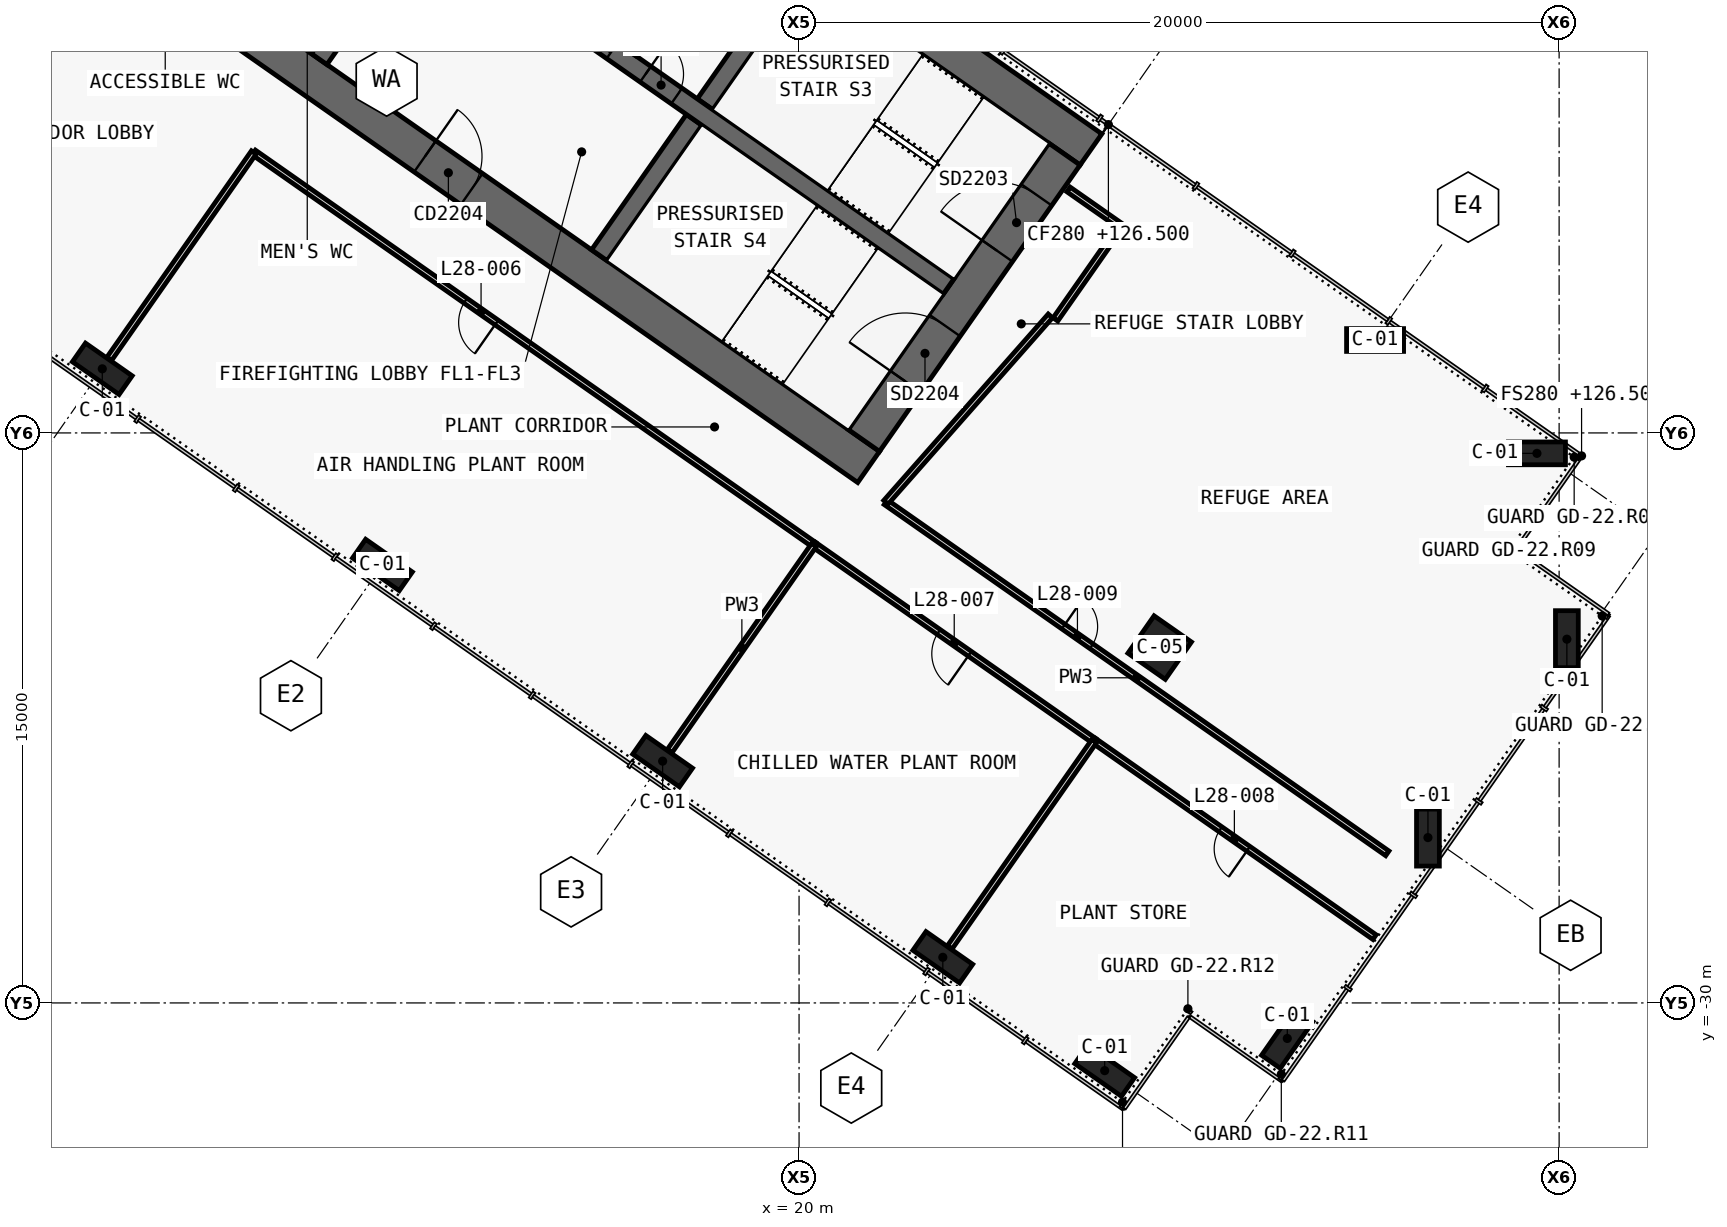
"""IFC4 building model, lengths in metres.
Left out: names, types, materials, properties, quantities, classifications, styles, units other than length and angle.
Written with IfcOpenShell. Run it as: python <this file> out.ifc"""

import sys

from ifc_helpers import new_model, si_unit, direction, frame, frame_2d, origin, origin_2d, place, context, subcontext, project, spatial, polyline, rectangle, outline, extrude, clip, halfspace, element, fill, save


model = new_model("IFC4")
c1 = context("Model", 3, precision=1e-05, world=origin(), true_north=direction((0.0, 1.0)))
c2 = subcontext(c1, "Body", "Model", "MODEL_VIEW")
j1 = project(units=[si_unit("LENGTHUNIT", "METRE"), si_unit("PLANEANGLEUNIT", "RADIAN")], contexts=[c1])
p1 = place(None, origin())
s1 = spatial("IfcSite", under=j1, at=p1, CompositionType="ELEMENT")
p2 = place(p1, origin())
s2 = spatial("IfcBuilding", under=s1, at=p2, CompositionType="ELEMENT")
p3 = place(p2, frame((0.0, 0.0, 126.5)))
s3 = spatial("IfcBuildingStorey", under=s2, at=p3, CompositionType="ELEMENT", Elevation=126.5)
p4 = place(p3, frame((-0.037, 11.867, 0.0), z_axis=(0.0, 0.0, 1.0), x_axis=(0.819155306259, -0.573571777746, 0.0)))
e1 = element("IfcWall", 1, at=p4, inside=s3, PredefinedType="SHEAR", context=c2, shape_type="SweptSolid", body=[
    extrude(outline(polyline([(33.837, 0.5), (0.0, 0.5), (0.7, -0.5), (33.837, -0.5), (33.837, 0.5)])), origin(), (0.0, 0.0, 1.0), 5.5),
])
p5 = place(p3, frame((-0.037, -0.585, 0.0), z_axis=(0.0, 0.0, 1.0), x_axis=(0.819157152511, -0.573569140985, 0.0)))
e2 = element("IfcWall", 2, at=p5, inside=s3, PredefinedType="SHEAR", context=c2, shape_type="SweptSolid", body=[
    extrude(outline(polyline([(26.695, 0.5), (0.0, 0.5), (0.7, -0.5), (26.695, -0.5), (26.695, 0.5)])), origin(), (0.0, 0.0, 1.0), 5.5),
])
p6 = place(p5, frame((1.045, 0.0, 0.0)))
e3 = element("IfcOpeningElement", 3, at=p6, cuts=e2, PredefinedType="OPENING", context=c2, shape_type="SweptSolid", body=[
    extrude(rectangle(XDim=1.5, YDim=2.1, at=frame_2d((0.75, 1.05))), frame((0.0, 0.51, 0.0), z_axis=(0.0, -1.0, 0.0), x_axis=(1.0, 0.0, 0.0)), (0.0, 0.0, 1.0), 1.02),
])
p7 = place(p5, frame((12.445, 0.0, 0.0)))
e4 = element("IfcOpeningElement", 4, at=p7, cuts=e2, PredefinedType="OPENING", context=c2, shape_type="SweptSolid", body=[
    extrude(rectangle(XDim=1.5, YDim=2.1, at=frame_2d((0.75, 1.05))), frame((0.0, 0.51, 0.0), z_axis=(0.0, -1.0, 0.0), x_axis=(1.0, 0.0, 0.0)), (0.0, 0.0, 1.0), 1.02),
])
p8 = place(p3, frame((21.708, -15.2, 0.0), z_axis=(0.0, 0.0, 1.0), x_axis=(0.573576324356, 0.819152122709, 0.0)))
e5 = element("IfcWall", 5, at=p8, inside=s3, PredefinedType="SHEAR", context=c2, shape_type="SweptSolid", body=[
    extrude(outline(polyline([(9.2, 0.5), (0.0, 0.5), (0.0, -0.5), (9.2, -0.5), (9.2, 0.5)])), origin(), (0.0, 0.0, 1.0), 5.5),
])
p9 = place(p8, frame((6.1, 0.0, 0.0)))
e6 = element("IfcOpeningElement", 6, at=p9, cuts=e5, PredefinedType="OPENING", context=c2, shape_type="SweptSolid", body=[
    extrude(rectangle(XDim=1.8, YDim=2.1, at=frame_2d((0.9, 1.05))), frame((0.0, 0.51, 0.0), z_axis=(0.0, -1.0, 0.0), x_axis=(1.0, 0.0, 0.0)), (0.0, 0.0, 1.0), 1.02),
])
p10 = place(p8, frame((1.9, 0.0, 0.0)))
e7 = element("IfcOpeningElement", 7, at=p10, cuts=e5, PredefinedType="OPENING", context=c2, shape_type="SweptSolid", body=[
    extrude(rectangle(XDim=1.8, YDim=2.1, at=frame_2d((0.9, 1.05))), frame((0.0, 0.51, 0.0), z_axis=(0.0, -1.0, 0.0), x_axis=(1.0, 0.0, 0.0)), (0.0, 0.0, 1.0), 1.02),
])
p11 = place(p3, frame((7.372, -5.162, 0.0), z_axis=(0.0, 0.0, 1.0), x_axis=(0.573594173421, 0.819139624372, 0.0)))
e8 = element("IfcWall", 8, at=p11, inside=s3, PredefinedType="SHEAR", context=c2, shape_type="SweptSolid", body=[
    extrude(outline(polyline([(0.0, 0.25), (0.0, -0.25), (4.35, -0.25), (4.35, 0.25), (0.0, 0.25)])), origin(), (0.0, 0.0, 1.0), 5.5),
])
p12 = place(p3, frame((14.745, -10.324, 0.0), z_axis=(0.0, 0.0, 1.0), x_axis=(0.57356780395, 0.819158088694, 0.0)))
e9 = element("IfcWall", 9, at=p12, inside=s3, PredefinedType="SHEAR", context=c2, shape_type="SweptSolid", body=[
    extrude(outline(polyline([(0.0, 0.25), (0.0, -0.25), (4.35, -0.25), (4.35, 0.25), (0.0, 0.25)])), origin(), (0.0, 0.0, 1.0), 5.5),
])
p13 = place(p3, frame((17.527, -6.352, 0.0), z_axis=(0.0, 0.0, 1.0), x_axis=(0.573530143085, 0.819184457233, 0.0)))
e10 = element("IfcWall", 10, at=p13, inside=s3, PredefinedType="SHEAR", context=c2, shape_type="SweptSolid", body=[
    extrude(outline(polyline([(4.35, -0.25), (4.35, 0.25), (0.0, 0.25), (0.0, -0.25), (4.35, -0.25)])), origin(), (0.0, 0.0, 1.0), 5.5),
])
p14 = place(p3, frame((2.638, 3.768, 0.0), z_axis=(0.0, 0.0, 1.0), x_axis=(0.819148977158, -0.573580816643, 0.0)))
e11 = element("IfcWall", 11, at=p14, inside=s3, PredefinedType="SHEAR", context=c2, shape_type="SweptSolid", body=[
    extrude(outline(polyline([(0.0, 0.25), (0.0, -0.25), (26.0, -0.25), (26.0, 0.25), (0.0, 0.25)])), origin(), (0.0, 0.0, 1.0), 5.5),
])
p15 = place(p14, frame((9.637, 0.0, 0.0)))
e12 = element("IfcOpeningElement", 12, at=p15, cuts=e11, PredefinedType="OPENING", context=c2, shape_type="SweptSolid", body=[
    extrude(rectangle(XDim=1.2, YDim=2.1, at=frame_2d((0.6, 1.05))), frame((0.0, 0.26, 0.0), z_axis=(0.0, -1.0, 0.0), x_axis=(1.0, 0.0, 0.0)), (0.0, 0.0, 1.0), 0.52),
])
p16 = place(p14, frame((11.812, 0.0, 0.0)))
e13 = element("IfcOpeningElement", 13, at=p16, cuts=e11, PredefinedType="OPENING", context=c2, shape_type="SweptSolid", body=[
    extrude(rectangle(XDim=1.2, YDim=2.1, at=frame_2d((0.6, 1.05))), frame((0.0, 0.26, 0.0), z_axis=(0.0, -1.0, 0.0), x_axis=(1.0, 0.0, 0.0)), (0.0, 0.0, 1.0), 0.52),
])
p17 = place(p14, frame((13.988, 0.0, 0.0)))
e14 = element("IfcOpeningElement", 14, at=p17, cuts=e11, PredefinedType="OPENING", context=c2, shape_type="SweptSolid", body=[
    extrude(rectangle(XDim=1.2, YDim=2.1, at=frame_2d((0.6, 1.05))), frame((0.0, 0.26, 0.0), z_axis=(0.0, -1.0, 0.0), x_axis=(1.0, 0.0, 0.0)), (0.0, 0.0, 1.0), 0.52),
])
p18 = place(p14, frame((16.262, 0.0, 0.0)))
e15 = element("IfcOpeningElement", 15, at=p18, cuts=e11, PredefinedType="OPENING", context=c2, shape_type="SweptSolid", body=[
    extrude(rectangle(XDim=1.0, YDim=2.1, at=frame_2d((0.5, 1.05))), frame((0.0, 0.26, 0.0), z_axis=(0.0, -1.0, 0.0), x_axis=(1.0, 0.0, 0.0)), (0.0, 0.0, 1.0), 0.52),
])
for number, where, z_axis, x_axis in (
    (16, (1.665, -13.313, 0.0), (0.0, 0.0, 1.0), (0.819, -0.574, 0.0)),
    (17, (9.038, -18.475, 0.0), (0.0, 0.0, 1.0), (0.819, -0.574, 0.0)),
    (18, (16.41, -23.637, 0.0), (0.0, 0.0, 1.0), (0.819, -0.574, 0.0)),
    (19, (23.782, -28.799, 0.0), (0.0, 0.0, 1.0), (0.819, -0.574, 0.0)),
    (20, (28.042, -31.782, 0.0), (0.0, 0.0, 1.0), (0.819, -0.574, 0.0)),
):
    element("IfcColumn", number, at=place(p3, frame(where, z_axis=z_axis, x_axis=x_axis)), inside=s3, PredefinedType="COLUMN", context=c2, shape_type="SweptSolid", body=[
        extrude(rectangle(XDim=1.5, YDim=0.6, at=origin_2d()), origin(), (0.0, 0.0, 1.0), 5.5),
    ])
p19 = place(p3, frame((35.197, -12.498, 0.0), z_axis=(-0.260185843605, -0.371634610267, 0.891173969121), x_axis=(0.819188821475, -0.573523909503, 0.0)))
e21 = element("IfcColumn", 21, at=p19, inside=s3, PredefinedType="COLUMN", context=c2, shape_type="Clipping", body=[
    clip(clip(extrude(rectangle(XDim=1.5, YDim=0.6, at=origin_2d()), origin(), (0.0, 0.0, 1.0), 6.172), halfspace(frame((0.0, 0.0, 0.153), z_axis=(0.0, 0.0, 1.0), x_axis=(1.0, 0.0, 0.0)), True)), halfspace(frame((0.0, 0.0, 6.019), z_axis=(0.0, 0.0, 1.0), x_axis=(1.0, 0.0, 0.0)), False)),
])
p20 = place(p3, frame((39.456, -15.481, 0.0), z_axis=(-0.260224642099, -0.37163058595, 0.891164318872), x_axis=(0.819145722339, -0.573585464926, 0.0)))
e22 = element("IfcColumn", 22, at=p20, inside=s3, PredefinedType="COLUMN", context=c2, shape_type="Clipping", body=[
    clip(clip(extrude(rectangle(XDim=1.5, YDim=0.6, at=origin_2d()), origin(), (0.0, 0.0, 1.0), 6.172), halfspace(frame((0.0, 0.0, 0.153), z_axis=(0.0, 0.0, 1.0), x_axis=(1.0, 0.0, 0.0)), True)), halfspace(frame((0.0, 0.0, 6.019), z_axis=(0.0, 0.0, 1.0), x_axis=(1.0, 0.0, 0.0)), False)),
])
p21 = place(p3, frame((32.847, -30.935, 0.0), z_axis=(0.0, 0.0, 1.0), x_axis=(0.573576436351, 0.819152044289, 0.0)))
e23 = element("IfcColumn", 23, at=p21, inside=s3, PredefinedType="COLUMN", context=c2, shape_type="SweptSolid", body=[
    extrude(rectangle(XDim=1.5, YDim=0.6, at=origin_2d()), origin(), (0.0, 0.0, 1.0), 5.5),
])
p22 = place(p3, frame((36.575, -25.61, 0.0), z_axis=(-0.141498421705, -0.202101070375, 0.969088929876), x_axis=(0.555808958936, 0.793857515663, 0.246711665698)))
e24 = element("IfcColumn", 24, at=p22, inside=s3, PredefinedType="COLUMN", context=c2, shape_type="Clipping", body=[
    clip(clip(extrude(rectangle(XDim=1.5, YDim=0.6, at=origin_2d()), origin(), (0.0, 0.0, 1.0), 5.675), halfspace(frame((0.0, 0.0, 0.191), z_axis=(0.0, 0.0, 1.0), x_axis=(1.0, 0.0, 0.0)), True)), halfspace(frame((0.0, 0.0, 5.484), z_axis=(0.0, 0.0, 1.0), x_axis=(1.0, 0.0, 0.0)), False)),
])
p23 = place(p3, frame((40.303, -20.286, 0.0), z_axis=(-0.260254273865, -0.37166928651, 0.891139525776), x_axis=(0.511148016967, 0.729970793355, 0.453729374848)))
e25 = element("IfcColumn", 25, at=p23, inside=s3, PredefinedType="COLUMN", context=c2, shape_type="Clipping", body=[
    clip(clip(extrude(rectangle(XDim=1.5, YDim=0.6, at=origin_2d()), origin(), (0.0, 0.0, 1.0), 6.172), halfspace(frame((0.0, 0.0, 0.382), z_axis=(0.0, 0.0, 1.0), x_axis=(1.0, 0.0, 0.0)), True)), halfspace(frame((0.0, 0.0, 5.79), z_axis=(0.0, 0.0, 1.0), x_axis=(1.0, 0.0, 0.0)), False)),
])
p24 = place(p3, frame((29.49, -20.649, 0.0), z_axis=(0.0, 0.0, 1.0), x_axis=(0.819152044289, -0.573576436351, 0.0)))
e26 = element("IfcColumn", 26, at=p24, inside=s3, PredefinedType="COLUMN", context=c2, shape_type="SweptSolid", body=[
    extrude(rectangle(XDim=1.2, YDim=1.2, at=origin_2d()), origin(), (0.0, 0.0, 1.0), 5.5),
])
p25 = place(p3, frame((15.622, -5.018, 0.0), z_axis=(0.0, 0.0, 1.0), x_axis=(0.573594173421, 0.819139624372, 0.0)))
e27 = element("IfcWall", 27, at=p25, inside=s3, PredefinedType="SOLIDWALL", context=c2, shape_type="SweptSolid", body=[
    extrude(rectangle(XDim=4.35, YDim=0.2, at=frame_2d((2.175, 0.0))), origin(), (0.0, 0.0, 1.0), 5.5),
])
p26 = place(p3, frame((22.284, -16.824, 0.0), z_axis=(0.0, 0.0, 1.0), x_axis=(0.819150741326, -0.573578297171, 0.0)))
e28 = element("IfcWall", 28, at=p26, inside=s3, PredefinedType="PARTITIONING", context=c2, shape_type="SweptSolid", body=[
    extrude(rectangle(XDim=16.109, YDim=0.15, at=frame_2d((8.054, 0.0))), origin(), (0.0, 0.0, 1.0), 4.6),
])
p27 = place(p26, frame((5.704, 0.0, 0.0)))
e29 = element("IfcOpeningElement", 29, at=p27, cuts=e28, PredefinedType="OPENING", context=c2, shape_type="SweptSolid", body=[
    extrude(rectangle(XDim=0.9, YDim=2.1, at=frame_2d((0.45, 1.05))), frame((0.0, 0.085, 0.0), z_axis=(0.0, -1.0, 0.0), x_axis=(1.0, 0.0, 0.0)), (0.0, 0.0, 1.0), 0.17),
])
p28 = place(p3, frame((20.398, -17.945, 0.0), z_axis=(0.0, 0.0, 1.0), x_axis=(-0.81916437852, 0.57355882084, 0.0)))
e30 = element("IfcWall", 30, at=p28, inside=s3, PredefinedType="PARTITIONING", context=c2, shape_type="SweptSolid", body=[
    extrude(rectangle(XDim=18.002, YDim=0.15, at=frame_2d((9.001, 0.0))), origin(), (0.0, 0.0, 1.0), 4.6),
])
p29 = place(p28, frame((10.201, 0.0, 0.0)))
e31 = element("IfcOpeningElement", 31, at=p29, cuts=e30, PredefinedType="OPENING", context=c2, shape_type="SweptSolid", body=[
    extrude(rectangle(XDim=1.0, YDim=2.1, at=frame_2d((0.5, 1.05))), frame((0.0, 0.085, 0.0), z_axis=(0.0, -1.0, 0.0), x_axis=(1.0, 0.0, 0.0)), (0.0, 0.0, 1.0), 0.17),
])
p30 = place(p3, frame((27.771, -23.107, 0.0), z_axis=(0.0, 0.0, 1.0), x_axis=(-0.819164400877, 0.57355878891, 0.0)))
e32 = element("IfcWall", 32, at=p30, inside=s3, PredefinedType="PARTITIONING", context=c2, shape_type="SweptSolid", body=[
    extrude(rectangle(XDim=9.004, YDim=0.15, at=frame_2d((4.502, 0.0))), origin(), (0.0, 0.0, 1.0), 4.6),
])
p31 = place(p30, frame((4.002, 0.0, 0.0)))
e33 = element("IfcOpeningElement", 33, at=p31, cuts=e32, PredefinedType="OPENING", context=c2, shape_type="SweptSolid", body=[
    extrude(rectangle(XDim=1.0, YDim=2.1, at=frame_2d((0.5, 1.05))), frame((0.0, 0.085, 0.0), z_axis=(0.0, -1.0, 0.0), x_axis=(1.0, 0.0, 0.0)), (0.0, 0.0, 1.0), 0.17),
])
p32 = place(p3, frame((35.142, -28.268, 0.0), z_axis=(0.0, 0.0, 1.0), x_axis=(-0.819165659482, 0.573556991349, 0.0)))
e34 = element("IfcWall", 34, at=p32, inside=s3, PredefinedType="PARTITIONING", context=c2, shape_type="SweptSolid", body=[
    extrude(rectangle(XDim=9.002, YDim=0.15, at=frame_2d((4.501, 0.0))), origin(), (0.0, 0.0, 1.0), 4.5),
])
p33 = place(p32, frame((4.051, 0.0, 0.0)))
e35 = element("IfcOpeningElement", 35, at=p33, cuts=e34, PredefinedType="OPENING", context=c2, shape_type="SweptSolid", body=[
    extrude(rectangle(XDim=0.9, YDim=2.1, at=frame_2d((0.45, 1.05))), frame((0.0, 0.085, 0.0), z_axis=(0.0, -1.0, 0.0), x_axis=(1.0, 0.0, 0.0)), (0.0, 0.0, 1.0), 0.17),
])
p34 = place(p3, frame((22.285, -16.825, 0.0), z_axis=(0.0, 0.0, 1.0), x_axis=(0.661551268245, 0.749899939647, 0.0)))
e36 = element("IfcWall", 36, at=p34, inside=s3, PredefinedType="PARTITIONING", context=c2, shape_type="SweptSolid", body=[
    extrude(rectangle(XDim=6.541, YDim=0.15, at=frame_2d((3.271, 0.0))), origin(), (0.0, 0.0, 1.0), 4.6),
])
p35 = place(p3, frame((26.746, -12.014, 0.0), z_axis=(0.0, 0.0, 1.0), x_axis=(0.573560650686, 0.819163097304, 0.0)))
e37 = element("IfcWall", 37, at=p35, inside=s3, PredefinedType="PARTITIONING", context=c2, shape_type="SweptSolid", body=[
    extrude(rectangle(XDim=3.0, YDim=0.15, at=frame_2d((1.5, 0.0))), origin(), (0.0, 0.0, 1.0), 4.6),
])
p36 = place(p3, frame((28.467, -9.556, 0.0), z_axis=(0.0, 0.0, 1.0), x_axis=(-0.819109000826, 0.573637903879, 0.0)))
e38 = element("IfcWall", 38, at=p36, inside=s3, PredefinedType="PARTITIONING", context=c2, shape_type="SweptSolid", body=[
    extrude(rectangle(XDim=1.68, YDim=0.15, at=frame_2d((0.84, 0.0))), origin(), (0.0, 0.0, 1.0), 5.22),
])
p37 = place(p3, frame((20.396, -17.944, 0.0), z_axis=(0.0, 0.0, 1.0), x_axis=(-0.57359826181, -0.819136761505, 0.0)))
e39 = element("IfcWall", 39, at=p37, inside=s3, PredefinedType="PARTITIONING", context=c2, shape_type="SweptSolid", body=[
    extrude(rectangle(XDim=6.63, YDim=0.15, at=frame_2d((3.315, 0.0))), origin(), (0.0, 0.0, 1.0), 4.6),
])
p38 = place(p3, frame((1.849, -13.051, 0.0), z_axis=(0.0, 0.0, 1.0), x_axis=(0.57357355307, 0.819154063177, 0.0)))
e40 = element("IfcWall", 40, at=p38, inside=s3, PredefinedType="PARTITIONING", context=c2, shape_type="SweptSolid", body=[
    extrude(rectangle(XDim=6.63, YDim=0.15, at=frame_2d((3.315, 0.0))), origin(), (0.0, 0.0, 1.0), 4.6),
])
p39 = place(p3, frame((27.769, -23.106, 0.0), z_axis=(0.0, 0.0, 1.0), x_axis=(-0.57359826181, -0.819136761505, 0.0)))
e41 = element("IfcWall", 41, at=p39, inside=s3, PredefinedType="PARTITIONING", context=c2, shape_type="SweptSolid", body=[
    extrude(rectangle(XDim=6.63, YDim=0.15, at=frame_2d((3.315, 0.0))), origin(), (0.0, 0.0, 1.0), 4.6),
])
p40 = place(p18, origin())
e42 = element("IfcDoor", 42, at=p40, inside=s3, OperationType="SINGLE_SWING_RIGHT", PredefinedType="DOOR", context=c2, shape_type="SweptSolid", body=[
    extrude(rectangle(XDim=1.0, YDim=2.1, at=frame_2d((0.5, 1.05))), frame((0.0, 0.025, 0.0), z_axis=(0.0, -1.0, 0.0), x_axis=(1.0, 0.0, 0.0)), (0.0, 0.0, 1.0), 0.05),
])
fill(e15, e42)
p41 = place(p7, origin())
e43 = element("IfcDoor", 43, at=p41, inside=s3, OperationType="DOUBLE_DOOR_SINGLE_SWING", PredefinedType="DOOR", context=c2, shape_type="SweptSolid", body=[
    extrude(rectangle(XDim=1.5, YDim=2.1, at=frame_2d((0.75, 1.05))), frame((0.0, 0.025, 0.0), z_axis=(0.0, -1.0, 0.0), x_axis=(1.0, 0.0, 0.0)), (0.0, 0.0, 1.0), 0.05),
])
fill(e4, e43)
p42 = place(p9, origin())
e44 = element("IfcDoor", 44, at=p42, inside=s3, OperationType="DOUBLE_DOOR_SINGLE_SWING", PredefinedType="DOOR", context=c2, shape_type="SweptSolid", body=[
    extrude(rectangle(XDim=1.8, YDim=2.1, at=frame_2d((0.9, 1.05))), frame((0.0, 0.025, 0.0), z_axis=(0.0, -1.0, 0.0), x_axis=(1.0, 0.0, 0.0)), (0.0, 0.0, 1.0), 0.05),
])
fill(e6, e44)
p43 = place(p10, origin())
e45 = element("IfcDoor", 45, at=p43, inside=s3, OperationType="DOUBLE_DOOR_SINGLE_SWING", PredefinedType="DOOR", context=c2, shape_type="SweptSolid", body=[
    extrude(rectangle(XDim=1.8, YDim=2.1, at=frame_2d((0.9, 1.05))), frame((0.0, 0.025, 0.0), z_axis=(0.0, -1.0, 0.0), x_axis=(1.0, 0.0, 0.0)), (0.0, 0.0, 1.0), 0.05),
])
fill(e7, e45)
p44 = place(p29, origin())
e46 = element("IfcDoor", 46, at=p44, inside=s3, OperationType="SINGLE_SWING_LEFT", PredefinedType="DOOR", context=c2, shape_type="SweptSolid", body=[
    extrude(rectangle(XDim=1.0, YDim=2.1, at=frame_2d((0.5, 1.05))), frame((0.0, 0.025, 0.0), z_axis=(0.0, -1.0, 0.0), x_axis=(1.0, 0.0, 0.0)), (0.0, 0.0, 1.0), 0.05),
])
fill(e31, e46)
p45 = place(p31, origin())
e47 = element("IfcDoor", 47, at=p45, inside=s3, OperationType="SINGLE_SWING_RIGHT", PredefinedType="DOOR", context=c2, shape_type="SweptSolid", body=[
    extrude(rectangle(XDim=1.0, YDim=2.1, at=frame_2d((0.5, 1.05))), frame((0.0, 0.025, 0.0), z_axis=(0.0, -1.0, 0.0), x_axis=(1.0, 0.0, 0.0)), (0.0, 0.0, 1.0), 0.05),
])
fill(e33, e47)
p46 = place(p33, origin())
e48 = element("IfcDoor", 48, at=p46, inside=s3, OperationType="SINGLE_SWING_LEFT", PredefinedType="DOOR", context=c2, shape_type="SweptSolid", body=[
    extrude(rectangle(XDim=0.9, YDim=2.1, at=frame_2d((0.45, 1.05))), frame((0.0, 0.025, 0.0), z_axis=(0.0, -1.0, 0.0), x_axis=(1.0, 0.0, 0.0)), (0.0, 0.0, 1.0), 0.05),
])
fill(e35, e48)
p47 = place(p27, origin())
e49 = element("IfcDoor", 49, at=p47, inside=s3, OperationType="SINGLE_SWING_LEFT", PredefinedType="DOOR", context=c2, shape_type="SweptSolid", body=[
    extrude(rectangle(XDim=0.9, YDim=2.1, at=frame_2d((0.45, 1.05))), frame((0.0, 0.025, 0.0), z_axis=(0.0, -1.0, 0.0), x_axis=(1.0, 0.0, 0.0)), (0.0, 0.0, 1.0), 0.05),
])
fill(e29, e49)
save(model, sys.argv[1])
